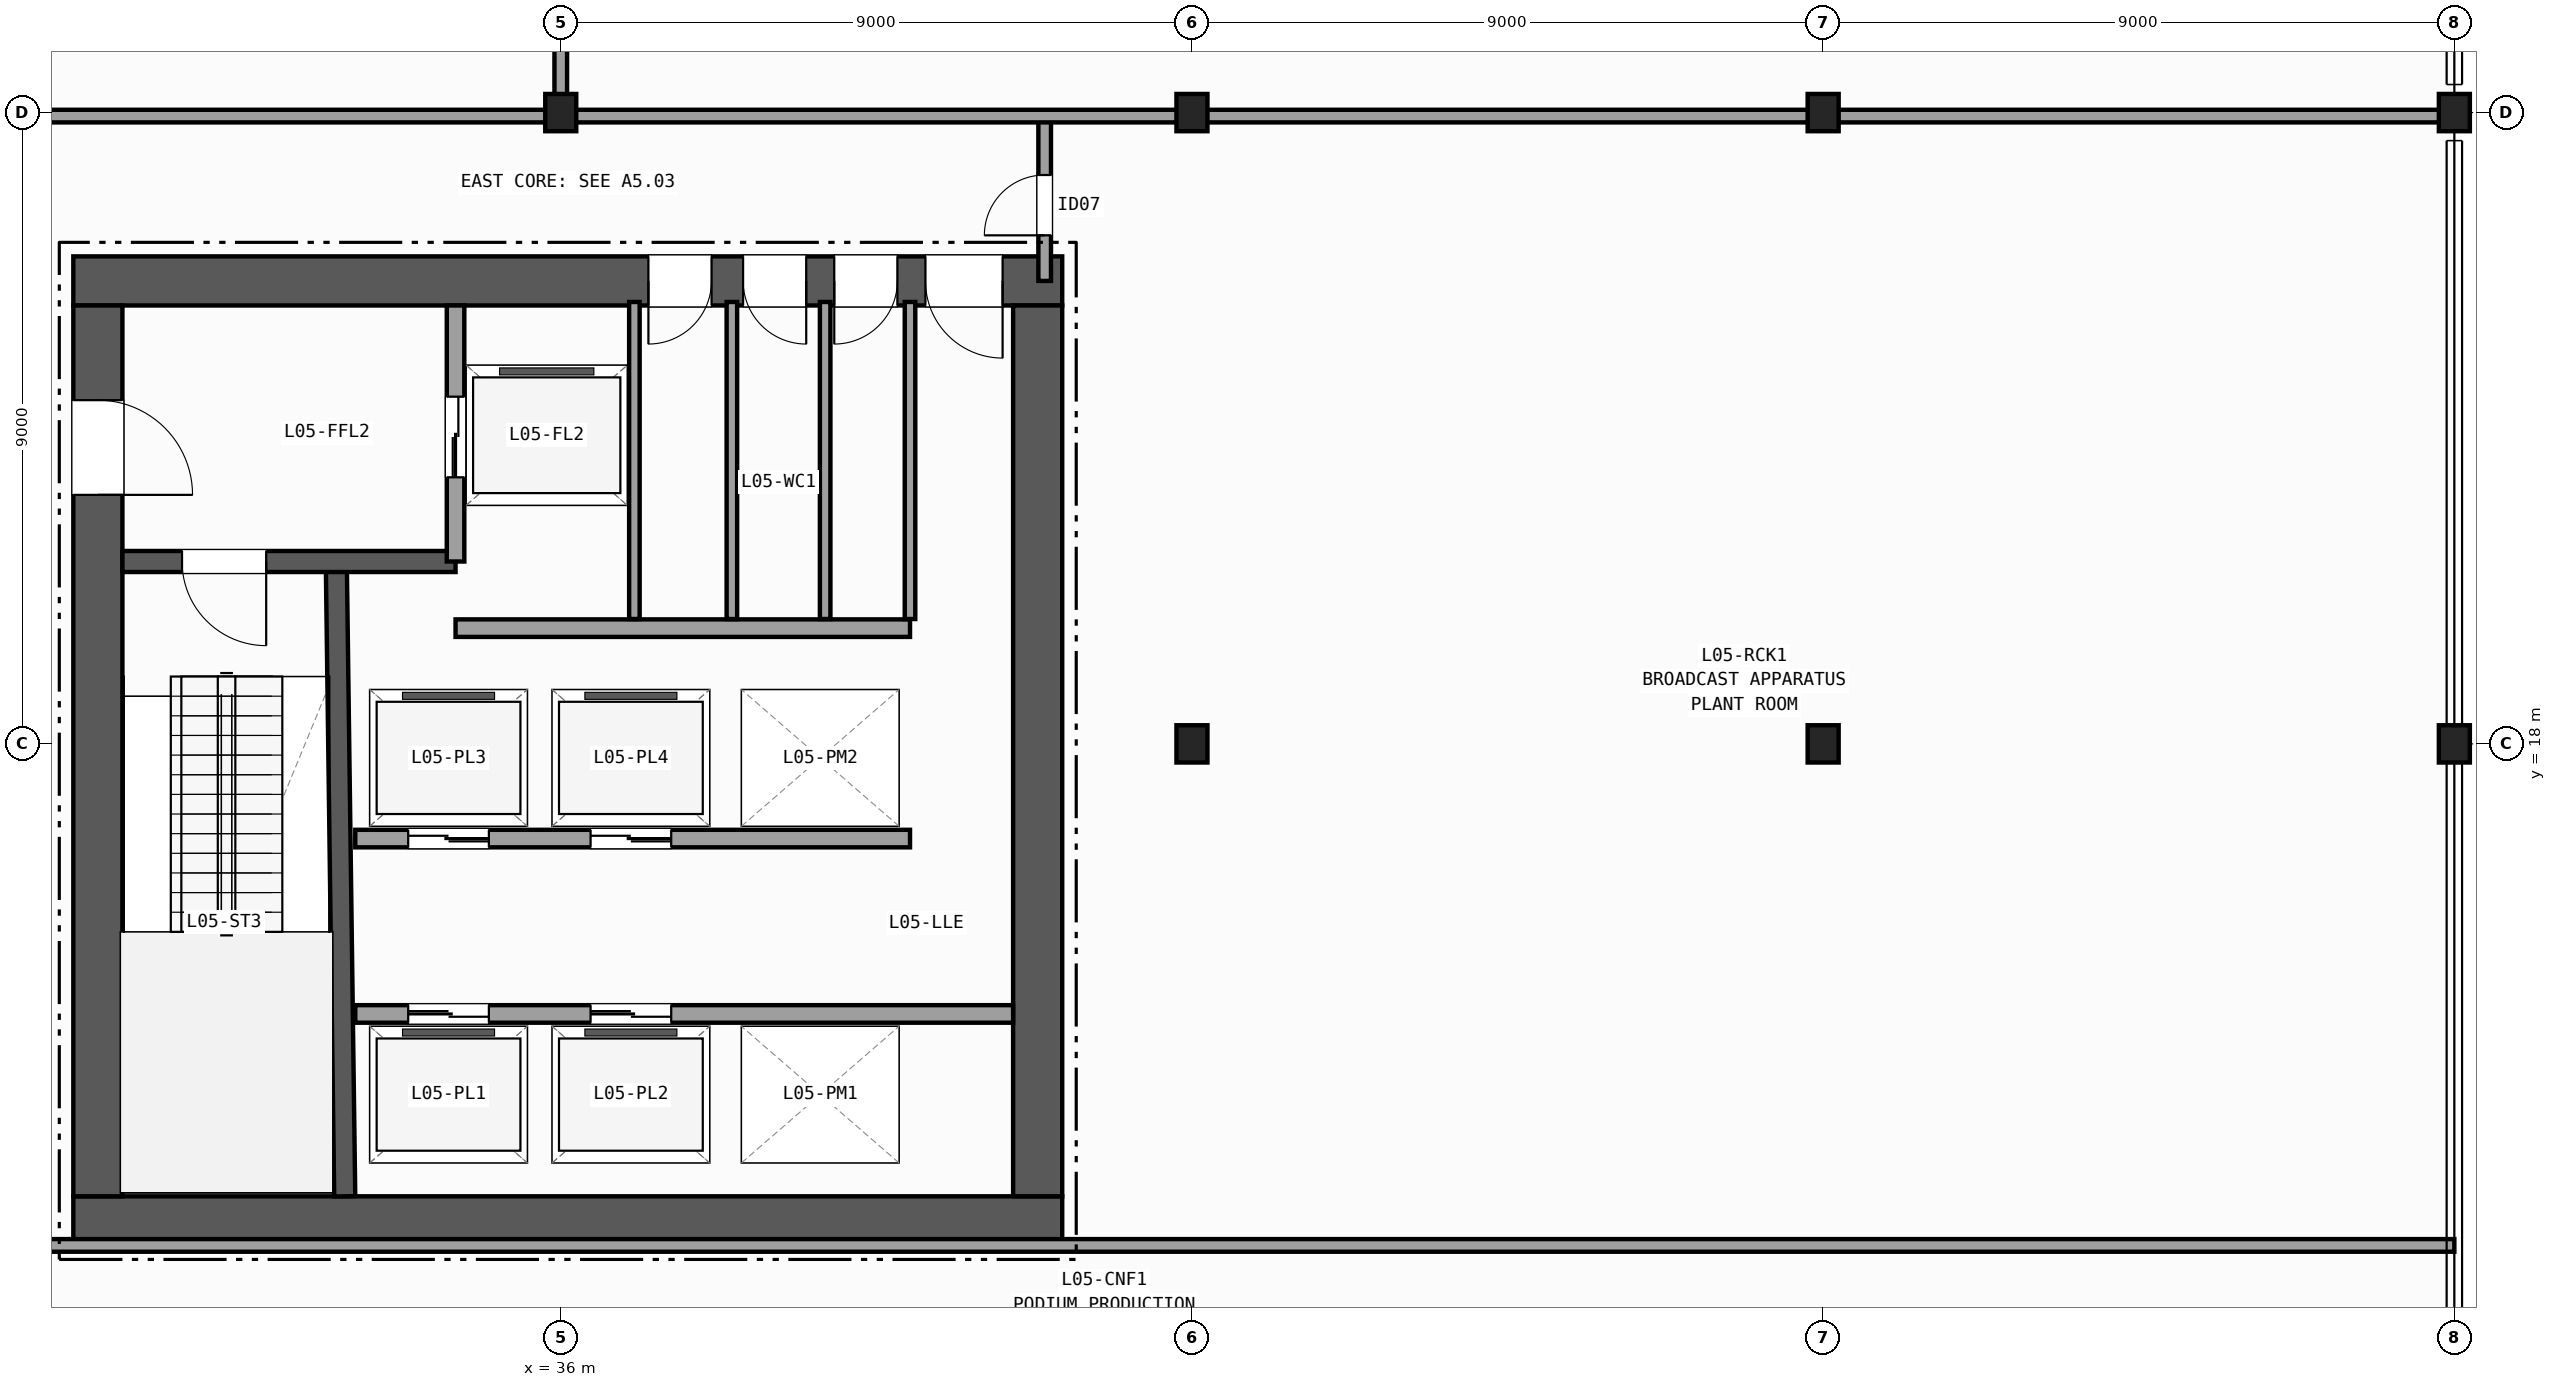
"""IFC4 building model, lengths in metres.
Left out: names, types, materials, properties, quantities, classifications, styles, units other than length and angle.
Written with IfcOpenShell. Run it as: python <this file> out.ifc"""

import sys

from ifc_helpers import new_model, si_unit, direction, frame, frame_2d, origin, origin_2d, place, context, subcontext, project, spatial, rectangle, i_section, extrude, element, fill, save


model = new_model("IFC4")
c1 = context("Model", 3, precision=1e-05, world=origin(), true_north=direction((0.0, 1.0)))
c2 = subcontext(c1, "Body", "Model", "MODEL_VIEW")
j1 = project(units=[si_unit("LENGTHUNIT", "METRE"), si_unit("PLANEANGLEUNIT", "RADIAN")], contexts=[c1])
p1 = place(None, origin())
s1 = spatial("IfcSite", under=j1, at=p1, CompositionType="ELEMENT")
p2 = place(p1, origin())
s2 = spatial("IfcBuilding", under=s1, at=p2, CompositionType="ELEMENT")
p3 = place(p2, frame((0.0, 0.0, 26.0)))
s3 = spatial("IfcBuildingStorey", under=s2, at=p3, CompositionType="ELEMENT", Elevation=26.0)
for number, where, z_axis, x_axis in (
    (1, (36.0, 27.0, 0.0), (0.0, 0.0, 1.0), (1.0, 0.0, 0.0)),
    (2, (45.0, 18.0, 0.0), (0.0, 0.0, 1.0), (1.0, 0.0, 0.0)),
    (3, (45.0, 27.0, 0.0), (0.0, 0.0, 1.0), (1.0, 0.0, 0.0)),
    (4, (54.0, 18.0, 0.0), (0.0, 0.0, 1.0), (1.0, 0.0, 0.0)),
    (5, (54.0, 27.0, 0.0), (0.0, 0.0, 1.0), (1.0, 0.0, 0.0)),
    (6, (63.0, 18.0, 0.0), (0.0, 0.0, 1.0), (1.0, 0.0, 0.0)),
    (7, (63.0, 27.0, 0.0), (0.0, 0.0, 1.0), (1.0, 0.0, 0.0)),
):
    element("IfcColumn", number, at=place(p3, frame(where, z_axis=z_axis, x_axis=x_axis)), inside=s3, PredefinedType="COLUMN", context=c2, shape_type="SweptSolid", body=[
        extrude(i_section(OverallWidth=0.442, OverallDepth=0.531, WebThickness=0.066, FlangeThickness=0.106, FilletRadius=0.015, at=origin_2d()), origin(), (0.0, 0.0, 1.0), 4.8),
    ])
p4 = place(p3, frame((29.05, 11.2, 0.0), z_axis=(0.0, 0.0, 1.0), x_axis=(1.0, 0.0, 0.0)))
e8 = element("IfcWall", 8, at=p4, inside=s3, PredefinedType="SHEAR", context=c2, shape_type="SweptSolid", body=[
    extrude(rectangle(XDim=14.1, YDim=0.7, at=frame_2d((7.05, 0.0))), origin(), (0.0, 0.0, 1.0), 4.44),
])
p5 = place(p3, frame((43.15, 24.6, 0.0), z_axis=(0.0, 0.0, 1.0), x_axis=(-1.0, 0.0, 0.0)))
e9 = element("IfcWall", 9, at=p5, inside=s3, PredefinedType="SHEAR", context=c2, shape_type="SweptSolid", body=[
    extrude(rectangle(XDim=14.1, YDim=0.7, at=frame_2d((7.05, 0.0))), origin(), (0.0, 0.0, 1.0), 4.44),
])
p6 = place(p5, frame((0.85, 0.0, 0.0)))
e10 = element("IfcOpeningElement", 10, at=p6, cuts=e9, PredefinedType="OPENING", context=c2, shape_type="SweptSolid", body=[
    extrude(rectangle(XDim=1.1, YDim=2.15, at=frame_2d((0.55, 1.075))), frame((0.0, 0.36, 0.0), z_axis=(0.0, -1.0, 0.0), x_axis=(1.0, 0.0, 0.0)), (0.0, 0.0, 1.0), 0.72),
])
p7 = place(p5, frame((2.35, 0.0, 0.0)))
e11 = element("IfcOpeningElement", 11, at=p7, cuts=e9, PredefinedType="OPENING", context=c2, shape_type="SweptSolid", body=[
    extrude(rectangle(XDim=0.9, YDim=2.1, at=frame_2d((0.45, 1.05))), frame((0.0, 0.36, 0.0), z_axis=(0.0, -1.0, 0.0), x_axis=(1.0, 0.0, 0.0)), (0.0, 0.0, 1.0), 0.72),
])
p8 = place(p5, frame((3.65, 0.0, 0.0)))
e12 = element("IfcOpeningElement", 12, at=p8, cuts=e9, PredefinedType="OPENING", context=c2, shape_type="SweptSolid", body=[
    extrude(rectangle(XDim=0.9, YDim=2.1, at=frame_2d((0.45, 1.05))), frame((0.0, 0.36, 0.0), z_axis=(0.0, -1.0, 0.0), x_axis=(1.0, 0.0, 0.0)), (0.0, 0.0, 1.0), 0.72),
])
p9 = place(p5, frame((5.0, 0.0, 0.0)))
e13 = element("IfcOpeningElement", 13, at=p9, cuts=e9, PredefinedType="OPENING", context=c2, shape_type="SweptSolid", body=[
    extrude(rectangle(XDim=0.9, YDim=2.1, at=frame_2d((0.45, 1.05))), frame((0.0, 0.36, 0.0), z_axis=(0.0, -1.0, 0.0), x_axis=(1.0, 0.0, 0.0)), (0.0, 0.0, 1.0), 0.72),
])
p10 = place(p3, frame((29.4, 24.25, 0.0), z_axis=(0.0, 0.0, 1.0), x_axis=(0.0, -1.0, 0.0)))
e14 = element("IfcWall", 14, at=p10, inside=s3, PredefinedType="SHEAR", context=c2, shape_type="SweptSolid", body=[
    extrude(rectangle(XDim=12.7, YDim=0.7, at=frame_2d((6.35, 0.0))), origin(), (0.0, 0.0, 1.0), 4.44),
])
p11 = place(p10, frame((1.35, 0.0, 0.0)))
e15 = element("IfcOpeningElement", 15, at=p11, cuts=e14, PredefinedType="OPENING", context=c2, shape_type="SweptSolid", body=[
    extrude(rectangle(XDim=1.35, YDim=2.15, at=frame_2d((0.675, 1.075))), frame((0.0, 0.36, 0.0), z_axis=(0.0, -1.0, 0.0), x_axis=(1.0, 0.0, 0.0)), (0.0, 0.0, 1.0), 0.72),
])
p12 = place(p3, frame((42.8, 11.55, 0.0), z_axis=(0.0, 0.0, 1.0), x_axis=(0.0, 1.0, 0.0)))
e16 = element("IfcWall", 16, at=p12, inside=s3, PredefinedType="SHEAR", context=c2, shape_type="SweptSolid", body=[
    extrude(rectangle(XDim=12.7, YDim=0.7, at=frame_2d((6.35, 0.0))), origin(), (0.0, 0.0, 1.0), 4.44),
])
p13 = place(p3, frame((32.92, 11.55, 0.0), z_axis=(0.0, 0.0, 1.0), x_axis=(-0.01331804616, 0.99991131089, 0.0)))
e17 = element("IfcWall", 17, at=p13, inside=s3, PredefinedType="SHEAR", context=c2, shape_type="SweptSolid", body=[
    extrude(rectangle(XDim=9.001, YDim=0.3, at=frame_2d((4.5, 0.0))), origin(), (0.0, 0.0, 1.0), 4.44),
])
p14 = place(p3, frame((34.5, 20.6, 0.0), z_axis=(0.0, 0.0, 1.0), x_axis=(-1.0, 0.0, 0.0)))
e18 = element("IfcWall", 18, at=p14, inside=s3, PredefinedType="SHEAR", context=c2, shape_type="SweptSolid", body=[
    extrude(rectangle(XDim=4.75, YDim=0.3, at=frame_2d((2.375, 0.0))), origin(), (0.0, 0.0, 1.0), 4.44),
])
p15 = place(p14, frame((2.7, 0.0, 0.0)))
e19 = element("IfcOpeningElement", 19, at=p15, cuts=e18, PredefinedType="OPENING", context=c2, shape_type="SweptSolid", body=[
    extrude(rectangle(XDim=1.2, YDim=2.15, at=frame_2d((0.6, 1.075))), frame((0.0, 0.16, 0.0), z_axis=(0.0, -1.0, 0.0), x_axis=(1.0, 0.0, 0.0)), (0.0, 0.0, 1.0), 0.32),
])
p16 = place(p3, frame((34.5, 20.6, 0.0), z_axis=(0.0, 0.0, 1.0), x_axis=(0.0, 1.0, 0.0)))
e20 = element("IfcWall", 20, at=p16, inside=s3, PredefinedType="PARTITIONING", context=c2, shape_type="SweptSolid", body=[
    extrude(rectangle(XDim=3.65, YDim=0.25, at=frame_2d((1.825, 0.0))), origin(), (0.0, 0.0, 1.0), 4.44),
])
p17 = place(p16, frame((1.2, 0.0, 0.0)))
e21 = element("IfcOpeningElement", 21, at=p17, cuts=e20, PredefinedType="OPENING", context=c2, shape_type="SweptSolid", body=[
    extrude(rectangle(XDim=1.15, YDim=2.15, at=frame_2d((0.575, 1.075))), frame((0.0, 0.135, 0.0), z_axis=(0.0, -1.0, 0.0), x_axis=(1.0, 0.0, 0.0)), (0.0, 0.0, 1.0), 0.27),
])
p18 = place(p3, frame((34.5, 19.65, 0.0), z_axis=(0.0, 0.0, 1.0), x_axis=(1.0, 0.0, 0.0)))
e22 = element("IfcWall", 22, at=p18, inside=s3, PredefinedType="PARTITIONING", context=c2, shape_type="SweptSolid", body=[
    extrude(rectangle(XDim=6.48, YDim=0.25, at=frame_2d((3.24, 0.0))), origin(), (0.0, 0.0, 1.0), 4.44),
])
p19 = place(p3, frame((33.07, 14.15, 0.0), z_axis=(0.0, 0.0, 1.0), x_axis=(1.0, 0.0, 0.0)))
e23 = element("IfcWall", 23, at=p19, inside=s3, PredefinedType="PARTITIONING", context=c2, shape_type="SweptSolid", body=[
    extrude(rectangle(XDim=9.38, YDim=0.25, at=frame_2d((4.69, 0.0))), origin(), (0.0, 0.0, 1.0), 4.44),
])
p20 = place(p19, frame((0.755, 0.0, 0.0)))
e24 = element("IfcOpeningElement", 24, at=p20, cuts=e23, PredefinedType="OPENING", context=c2, shape_type="SweptSolid", body=[
    extrude(rectangle(XDim=1.15, YDim=2.15, at=frame_2d((0.575, 1.075))), frame((0.0, 0.135, 0.0), z_axis=(0.0, -1.0, 0.0), x_axis=(1.0, 0.0, 0.0)), (0.0, 0.0, 1.0), 0.27),
])
p21 = place(p19, frame((3.355, 0.0, 0.0)))
e25 = element("IfcOpeningElement", 25, at=p21, cuts=e23, PredefinedType="OPENING", context=c2, shape_type="SweptSolid", body=[
    extrude(rectangle(XDim=1.15, YDim=2.15, at=frame_2d((0.575, 1.075))), frame((0.0, 0.135, 0.0), z_axis=(0.0, -1.0, 0.0), x_axis=(1.0, 0.0, 0.0)), (0.0, 0.0, 1.0), 0.27),
])
p22 = place(p3, frame((40.98, 16.65, 0.0), z_axis=(0.0, 0.0, 1.0), x_axis=(-1.0, 0.0, 0.0)))
e26 = element("IfcWall", 26, at=p22, inside=s3, PredefinedType="PARTITIONING", context=c2, shape_type="SweptSolid", body=[
    extrude(rectangle(XDim=7.91, YDim=0.25, at=frame_2d((3.955, 0.0))), origin(), (0.0, 0.0, 1.0), 4.44),
])
p23 = place(p22, frame((6.005, 0.0, 0.0)))
e27 = element("IfcOpeningElement", 27, at=p23, cuts=e26, PredefinedType="OPENING", context=c2, shape_type="SweptSolid", body=[
    extrude(rectangle(XDim=1.15, YDim=2.15, at=frame_2d((0.575, 1.075))), frame((0.0, 0.135, 0.0), z_axis=(0.0, -1.0, 0.0), x_axis=(1.0, 0.0, 0.0)), (0.0, 0.0, 1.0), 0.27),
])
p24 = place(p22, frame((3.405, 0.0, 0.0)))
e28 = element("IfcOpeningElement", 28, at=p24, cuts=e26, PredefinedType="OPENING", context=c2, shape_type="SweptSolid", body=[
    extrude(rectangle(XDim=1.15, YDim=2.15, at=frame_2d((0.575, 1.075))), frame((0.0, 0.135, 0.0), z_axis=(0.0, -1.0, 0.0), x_axis=(1.0, 0.0, 0.0)), (0.0, 0.0, 1.0), 0.27),
])
for number, where, z_axis, x_axis in (
    (29, (37.05, 19.78, 0.0), (0.0, 0.0, 1.0), (0.0, 1.0, 0.0)),
    (30, (38.44, 19.78, 0.0), (0.0, 0.0, 1.0), (0.0, 1.0, 0.0)),
    (31, (39.77, 19.78, 0.0), (0.0, 0.0, 1.0), (0.0, 1.0, 0.0)),
    (32, (40.98, 19.78, 0.0), (0.0, 0.0, 1.0), (0.0, 1.0, 0.0)),
):
    element("IfcWall", number, at=place(p3, frame(where, z_axis=z_axis, x_axis=x_axis)), inside=s3, PredefinedType="PARTITIONING", context=c2, shape_type="SweptSolid", body=[
        extrude(rectangle(XDim=4.52, YDim=0.15, at=frame_2d((2.26, 0.0))), origin(), (0.0, 0.0, 1.0), 4.44),
    ])
p25 = place(p3, frame((24.65, 10.85, 0.0), z_axis=(0.0, 0.0, 1.0), x_axis=(1.0, 0.0, 0.0)))
e33 = element("IfcWall", 33, at=p25, inside=s3, PredefinedType="PARTITIONING", context=c2, shape_type="SweptSolid", body=[
    extrude(rectangle(XDim=38.35, YDim=0.18, at=frame_2d((19.175, 0.0))), origin(), (0.0, 0.0, 1.0), 2.62),
])
p26 = place(p25, frame((2.0, 0.0, 0.0)))
e34 = element("IfcOpeningElement", 34, at=p26, cuts=e33, PredefinedType="OPENING", context=c2, shape_type="SweptSolid", body=[
    extrude(rectangle(XDim=1.2, YDim=2.15, at=frame_2d((0.6, 1.075))), frame((0.0, 0.1, 0.0), z_axis=(0.0, -1.0, 0.0), x_axis=(1.0, 0.0, 0.0)), (0.0, 0.0, 1.0), 0.2),
])
p27 = place(p3, frame((42.9, 24.6, 0.0), z_axis=(0.0, 0.0, 1.0), x_axis=(0.0, 1.0, 0.0)))
e35 = element("IfcWall", 35, at=p27, inside=s3, PredefinedType="PARTITIONING", context=c2, shape_type="SweptSolid", body=[
    extrude(rectangle(XDim=2.35, YDim=0.18, at=frame_2d((1.175, 0.0))), origin(), (0.0, 0.0, 1.0), 3.493),
])
p28 = place(p27, frame((0.65, 0.0, 0.0)))
e36 = element("IfcOpeningElement", 36, at=p28, cuts=e35, PredefinedType="OPENING", context=c2, shape_type="SweptSolid", body=[
    extrude(rectangle(XDim=0.86, YDim=2.05, at=frame_2d((0.43, 1.025))), frame((0.0, 0.1, 0.0), z_axis=(0.0, -1.0, 0.0), x_axis=(1.0, 0.0, 0.0)), (0.0, 0.0, 1.0), 0.2),
])
p29 = place(p3, frame((27.1, 26.95, 0.0), z_axis=(0.0, 0.0, 1.0), x_axis=(1.0, 0.0, 0.0)))
e37 = element("IfcWall", 37, at=p29, inside=s3, PredefinedType="PARTITIONING", context=c2, shape_type="SweptSolid", body=[
    extrude(rectangle(XDim=35.9, YDim=0.18, at=frame_2d((17.95, 0.0))), origin(), (0.0, 0.0, 1.0), 2.62),
])
p30 = place(p3, frame((36.0, 26.95, 0.0), z_axis=(0.0, 0.0, 1.0), x_axis=(0.0, 1.0, 0.0)))
e38 = element("IfcWall", 38, at=p30, inside=s3, PredefinedType="PARTITIONING", context=c2, shape_type="SweptSolid", body=[
    extrude(rectangle(XDim=27.05, YDim=0.18, at=frame_2d((13.525, 0.0))), origin(), (0.0, 0.0, 1.0), 3.493),
])
p31 = place(p30, frame((4.5, 0.0, 0.0)))
e39 = element("IfcOpeningElement", 39, at=p31, cuts=e38, PredefinedType="OPENING", context=c2, shape_type="SweptSolid", body=[
    extrude(rectangle(XDim=1.05, YDim=2.15, at=frame_2d((0.525, 1.075))), frame((0.0, 0.1, 0.0), z_axis=(0.0, -1.0, 0.0), x_axis=(1.0, 0.0, 0.0)), (0.0, 0.0, 1.0), 0.2),
])
p32 = place(p15, origin())
e40 = element("IfcDoor", 40, at=p32, inside=s3, OperationType="SINGLE_SWING_LEFT", PredefinedType="DOOR", context=c2, shape_type="SweptSolid", body=[
    extrude(rectangle(XDim=1.2, YDim=2.15, at=frame_2d((0.6, 1.075))), frame((0.0, 0.025, 0.0), z_axis=(0.0, -1.0, 0.0), x_axis=(1.0, 0.0, 0.0)), (0.0, 0.0, 1.0), 0.05),
])
fill(e19, e40)
p33 = place(p11, origin())
e41 = element("IfcDoor", 41, at=p33, inside=s3, OperationType="SINGLE_SWING_RIGHT", PredefinedType="DOOR", context=c2, shape_type="SweptSolid", body=[
    extrude(rectangle(XDim=1.35, YDim=2.15, at=frame_2d((0.675, 1.075))), frame((0.0, 0.025, 0.0), z_axis=(0.0, -1.0, 0.0), x_axis=(1.0, 0.0, 0.0)), (0.0, 0.0, 1.0), 0.05),
])
fill(e15, e41)
p34 = place(p6, origin())
e42 = element("IfcDoor", 42, at=p34, inside=s3, OperationType="SINGLE_SWING_LEFT", PredefinedType="DOOR", context=c2, shape_type="SweptSolid", body=[
    extrude(rectangle(XDim=1.1, YDim=2.15, at=frame_2d((0.55, 1.075))), frame((0.0, 0.025, 0.0), z_axis=(0.0, -1.0, 0.0), x_axis=(1.0, 0.0, 0.0)), (0.0, 0.0, 1.0), 0.05),
])
fill(e10, e42)
p35 = place(p7, origin())
e43 = element("IfcDoor", 43, at=p35, inside=s3, OperationType="SINGLE_SWING_RIGHT", PredefinedType="DOOR", context=c2, shape_type="SweptSolid", body=[
    extrude(rectangle(XDim=0.9, YDim=2.1, at=frame_2d((0.45, 1.05))), frame((0.0, 0.025, 0.0), z_axis=(0.0, -1.0, 0.0), x_axis=(1.0, 0.0, 0.0)), (0.0, 0.0, 1.0), 0.05),
])
fill(e11, e43)
p36 = place(p8, origin())
e44 = element("IfcDoor", 44, at=p36, inside=s3, OperationType="SINGLE_SWING_LEFT", PredefinedType="DOOR", context=c2, shape_type="SweptSolid", body=[
    extrude(rectangle(XDim=0.9, YDim=2.1, at=frame_2d((0.45, 1.05))), frame((0.0, 0.025, 0.0), z_axis=(0.0, -1.0, 0.0), x_axis=(1.0, 0.0, 0.0)), (0.0, 0.0, 1.0), 0.05),
])
fill(e12, e44)
p37 = place(p9, origin())
e45 = element("IfcDoor", 45, at=p37, inside=s3, OperationType="SINGLE_SWING_RIGHT", PredefinedType="DOOR", context=c2, shape_type="SweptSolid", body=[
    extrude(rectangle(XDim=0.9, YDim=2.1, at=frame_2d((0.45, 1.05))), frame((0.0, 0.025, 0.0), z_axis=(0.0, -1.0, 0.0), x_axis=(1.0, 0.0, 0.0)), (0.0, 0.0, 1.0), 0.05),
])
fill(e13, e45)
p38 = place(p17, origin())
e46 = element("IfcDoor", 46, at=p38, inside=s3, OperationType="DOUBLE_DOOR_SLIDING", PredefinedType="DOOR", context=c2, shape_type="SweptSolid", body=[
    extrude(rectangle(XDim=1.15, YDim=2.15, at=frame_2d((0.575, 1.075))), frame((0.0, 0.025, 0.0), z_axis=(0.0, -1.0, 0.0), x_axis=(1.0, 0.0, 0.0)), (0.0, 0.0, 1.0), 0.05),
])
fill(e21, e46)
p39 = place(p20, origin())
e47 = element("IfcDoor", 47, at=p39, inside=s3, OperationType="DOUBLE_DOOR_SLIDING", PredefinedType="DOOR", context=c2, shape_type="SweptSolid", body=[
    extrude(rectangle(XDim=1.15, YDim=2.15, at=frame_2d((0.575, 1.075))), frame((0.0, 0.025, 0.0), z_axis=(0.0, -1.0, 0.0), x_axis=(1.0, 0.0, 0.0)), (0.0, 0.0, 1.0), 0.05),
])
fill(e24, e47)
p40 = place(p21, origin())
e48 = element("IfcDoor", 48, at=p40, inside=s3, OperationType="DOUBLE_DOOR_SLIDING", PredefinedType="DOOR", context=c2, shape_type="SweptSolid", body=[
    extrude(rectangle(XDim=1.15, YDim=2.15, at=frame_2d((0.575, 1.075))), frame((0.0, 0.025, 0.0), z_axis=(0.0, -1.0, 0.0), x_axis=(1.0, 0.0, 0.0)), (0.0, 0.0, 1.0), 0.05),
])
fill(e25, e48)
p41 = place(p23, origin())
e49 = element("IfcDoor", 49, at=p41, inside=s3, OperationType="DOUBLE_DOOR_SLIDING", PredefinedType="DOOR", context=c2, shape_type="SweptSolid", body=[
    extrude(rectangle(XDim=1.15, YDim=2.15, at=frame_2d((0.575, 1.075))), frame((0.0, 0.025, 0.0), z_axis=(0.0, -1.0, 0.0), x_axis=(1.0, 0.0, 0.0)), (0.0, 0.0, 1.0), 0.05),
])
fill(e27, e49)
p42 = place(p24, origin())
e50 = element("IfcDoor", 50, at=p42, inside=s3, OperationType="DOUBLE_DOOR_SLIDING", PredefinedType="DOOR", context=c2, shape_type="SweptSolid", body=[
    extrude(rectangle(XDim=1.15, YDim=2.15, at=frame_2d((0.575, 1.075))), frame((0.0, 0.025, 0.0), z_axis=(0.0, -1.0, 0.0), x_axis=(1.0, 0.0, 0.0)), (0.0, 0.0, 1.0), 0.05),
])
fill(e28, e50)
p43 = place(p28, origin())
e51 = element("IfcDoor", 51, at=p43, inside=s3, OperationType="SINGLE_SWING_LEFT", PredefinedType="DOOR", context=c2, shape_type="SweptSolid", body=[
    extrude(rectangle(XDim=0.86, YDim=2.05, at=frame_2d((0.43, 1.025))), frame((0.0, 0.025, 0.0), z_axis=(0.0, -1.0, 0.0), x_axis=(1.0, 0.0, 0.0)), (0.0, 0.0, 1.0), 0.05),
])
fill(e36, e51)
save(model, sys.argv[1])
